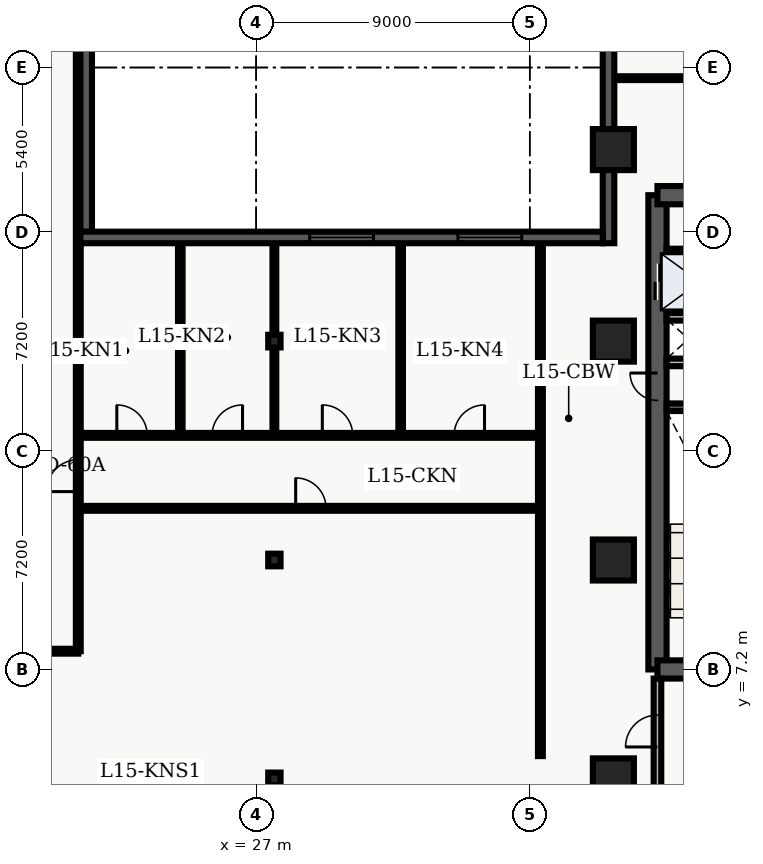
"""IFC4 building model, lengths in metres.
Left out: names, types, materials, properties, quantities, classifications, styles, units other than length and angle.
Written with IfcOpenShell. Run it as: python <this file> out.ifc"""

import sys

from ifc_helpers import new_model, entity, si_unit, converted_unit, direction, frame, origin_with_axes, origin_2d_with_axis, place, context, subcontext, project, spatial, polyline, rectangle, i_section, outline, extrude, element, fill, save


model = new_model("IFC4")
c1 = context("Model", 3, precision=1e-05, world=origin_with_axes(), true_north=direction((0.0, 1.0)))
c2 = subcontext(c1, "Body", "Model", "MODEL_VIEW")
j1 = project(units=[si_unit("LENGTHUNIT", "METRE"), converted_unit("PLANEANGLEUNIT", "DEGREE", entity("IfcPlaneAngleMeasure", 0.017), si_unit("PLANEANGLEUNIT", "RADIAN"), dimensions=[0, 0, 0, 0, 0, 0, 0])], contexts=[c1])
p1 = place(None, origin_with_axes())
s1 = spatial("IfcSite", under=j1, at=p1, CompositionType="ELEMENT")
p2 = place(p1, origin_with_axes())
s2 = spatial("IfcBuilding", under=s1, at=p2, CompositionType="ELEMENT")
p3 = place(p2, frame((0.0, 0.0, 63.9), z_axis=(0.0, 0.0, 1.0), x_axis=(1.0, 0.0, 0.0)))
s3 = spatial("IfcBuildingStorey", under=s2, at=p3, CompositionType="ELEMENT", Elevation=63.9)
p4 = place(p3, frame((40.2, 7.2, 0.0), z_axis=(0.0, 0.0, 1.0), x_axis=(0.0, 1.0, 0.0)))
e1 = element("IfcWall", 1, at=p4, inside=s3, PredefinedType="SHEAR", context=c2, shape_type="SweptSolid", body=[
    extrude(outline(polyline([(0.0, -0.3), (15.6, -0.3), (15.6, 0.3), (0.0, 0.3), (0.0, -0.3)])), origin_with_axes(), (0.0, 0.0, 1.0), 3.66),
])
p5 = place(p4, frame((12.75, 0.0, 0.0), z_axis=(0.0, 0.0, 1.0), x_axis=(1.0, 0.0, 0.0)))
e2 = element("IfcOpeningElement", 2, at=p5, cuts=e1, PredefinedType="OPENING", context=c2, shape_type="SweptSolid", body=[
    extrude(rectangle(XDim=1.2, YDim=0.62, at=origin_2d_with_axis()), origin_with_axes(), (0.0, 0.0, 1.0), 2.15),
])
p6 = place(p4, frame((9.3, 0.0, 0.0), z_axis=(0.0, 0.0, 1.0), x_axis=(1.0, 0.0, 0.0)))
e3 = element("IfcOpeningElement", 3, at=p6, cuts=e1, PredefinedType="OPENING", context=c2, shape_type="SweptSolid", body=[
    extrude(rectangle(XDim=0.9, YDim=0.62, at=origin_2d_with_axis()), origin_with_axes(), (0.0, 0.0, 1.0), 2.15),
])
p7 = place(p3, frame((40.2, 7.2, 0.0), z_axis=(0.0, 0.0, 1.0), x_axis=(1.0, 0.0, 0.0)))
e4 = element("IfcWall", 4, at=p7, inside=s3, PredefinedType="SHEAR", context=c2, shape_type="SweptSolid", body=[
    extrude(outline(polyline([(0.0, -0.3), (7.85, -0.3), (7.85, 0.3), (0.0, 0.3), (0.0, -0.3)])), origin_with_axes(), (0.0, 0.0, 1.0), 3.66),
])
p8 = place(p7, frame((2.175, 0.0, 0.0), z_axis=(0.0, 0.0, 1.0), x_axis=(1.0, 0.0, 0.0)))
e5 = element("IfcOpeningElement", 5, at=p8, cuts=e4, PredefinedType="OPENING", context=c2, shape_type="SweptSolid", body=[
    extrude(rectangle(XDim=1.05, YDim=0.62, at=origin_2d_with_axis()), origin_with_axes(), (0.0, 0.0, 1.0), 2.15),
])
p9 = place(p3, frame((40.2, 22.8, 0.0), z_axis=(0.0, 0.0, 1.0), x_axis=(1.0, 0.0, 0.0)))
e6 = element("IfcWall", 6, at=p9, inside=s3, PredefinedType="SHEAR", context=c2, shape_type="SweptSolid", body=[
    extrude(outline(polyline([(0.0, -0.3), (7.85, -0.3), (7.85, 0.3), (0.0, 0.3), (0.0, -0.3)])), origin_with_axes(), (0.0, 0.0, 1.0), 3.66),
])
p10 = place(p9, frame((5.775, 0.0, 0.0), z_axis=(0.0, 0.0, 1.0), x_axis=(1.0, 0.0, 0.0)))
e7 = element("IfcOpeningElement", 7, at=p10, cuts=e6, PredefinedType="OPENING", context=c2, shape_type="SweptSolid", body=[
    extrude(rectangle(XDim=1.05, YDim=0.62, at=origin_2d_with_axis()), origin_with_axes(), (0.0, 0.0, 1.0), 2.15),
])
p11 = place(p9, frame((2.15, 0.0, 0.0), z_axis=(0.0, 0.0, 1.0), x_axis=(1.0, 0.0, 0.0)))
e8 = element("IfcOpeningElement", 8, at=p11, cuts=e6, PredefinedType="OPENING", context=c2, shape_type="SweptSolid", body=[
    extrude(rectangle(XDim=0.9, YDim=0.62, at=origin_2d_with_axis()), origin_with_axes(), (0.0, 0.0, 1.0), 2.15),
])
p12 = place(p3, frame((40.5, 15.825, 0.0), z_axis=(0.0, 0.0, 1.0), x_axis=(1.0, 0.0, 0.0)))
e9 = element("IfcWall", 9, at=p12, inside=s3, PredefinedType="SHEAR", context=c2, shape_type="SweptSolid", body=[
    extrude(outline(polyline([(0.0, -0.125), (3.5, -0.125), (3.5, 0.125), (0.0, 0.125), (0.0, -0.125)])), origin_with_axes(), (0.0, 0.0, 1.0), 3.66),
])
p13 = place(p3, frame((40.5, 17.3, 0.0), z_axis=(0.0, 0.0, 1.0), x_axis=(1.0, 0.0, 0.0)))
e10 = element("IfcWall", 10, at=p13, inside=s3, PredefinedType="SOLIDWALL", context=c2, shape_type="SweptSolid", body=[
    extrude(outline(polyline([(0.0, -0.125), (3.5, -0.125), (3.5, 0.125), (0.0, 0.125), (0.0, -0.125)])), origin_with_axes(), (0.0, 0.0, 1.0), 2.7),
])
p14 = place(p13, frame((2.4, 0.0, 0.0), z_axis=(0.0, 0.0, 1.0), x_axis=(1.0, 0.0, 0.0)))
e11 = element("IfcOpeningElement", 11, at=p14, cuts=e10, PredefinedType="OPENING", context=c2, shape_type="SweptSolid", body=[
    extrude(rectangle(XDim=0.9, YDim=0.27, at=origin_2d_with_axis()), origin_with_axes(), (0.0, 0.0, 1.0), 2.15),
])
p15 = place(p3, frame((40.5, 18.8, 0.0), z_axis=(0.0, 0.0, 1.0), x_axis=(1.0, 0.0, 0.0)))
e12 = element("IfcWall", 12, at=p15, inside=s3, PredefinedType="SOLIDWALL", context=c2, shape_type="SweptSolid", body=[
    extrude(outline(polyline([(0.0, -0.125), (3.5, -0.125), (3.5, 0.125), (0.0, 0.125), (0.0, -0.125)])), origin_with_axes(), (0.0, 0.0, 1.0), 2.7),
])
p16 = place(p3, frame((40.2, 3.1, 0.0), z_axis=(0.0, 0.0, 1.0), x_axis=(0.0, 1.0, 0.0)))
e13 = element("IfcWall", 13, at=p16, inside=s3, PredefinedType="SOLIDWALL", context=c2, shape_type="SweptSolid", body=[
    extrude(outline(polyline([(0.0, -0.125), (3.8, -0.125), (3.8, 0.125), (0.0, 0.125), (0.0, -0.125)])), origin_with_axes(), (0.0, 0.0, 1.0), 2.7),
])
p17 = place(p16, frame((2.075, 0.0, 0.0), z_axis=(0.0, 0.0, 1.0), x_axis=(1.0, 0.0, 0.0)))
e14 = element("IfcOpeningElement", 14, at=p17, cuts=e13, PredefinedType="OPENING", context=c2, shape_type="SweptSolid", body=[
    extrude(rectangle(XDim=1.05, YDim=0.27, at=origin_2d_with_axis()), origin_with_axes(), (0.0, 0.0, 1.0), 2.15),
])
for number, where, z_axis, x_axis in (
    (15, (27.6, 3.6, 0.0), (0.0, 0.0, 1.0), (1.0, 0.0, 0.0)),
    (16, (27.6, 10.8, 0.0), (0.0, 0.0, 1.0), (1.0, 0.0, 0.0)),
    (17, (27.6, 18.0, 0.0), (0.0, 0.0, 1.0), (1.0, 0.0, 0.0)),
):
    element("IfcColumn", number, at=place(p3, frame(where, z_axis=z_axis, x_axis=x_axis)), inside=s3, PredefinedType="COLUMN", context=c2, shape_type="SweptSolid", body=[
        extrude(i_section(OverallWidth=0.406, OverallDepth=0.416, WebThickness=0.03, FlangeThickness=0.048, FilletRadius=0.022, at=origin_2d_with_axis()), origin_with_axes(), (0.0, 0.0, 1.0), 3.9),
    ])
for number, where, z_axis, x_axis in (
    (18, (38.75, 3.6, 0.0), (0.0, 0.0, 1.0), (1.0, 0.0, 0.0)),
    (19, (38.75, 10.8, 0.0), (0.0, 0.0, 1.0), (1.0, 0.0, 0.0)),
    (20, (38.75, 18.0, 0.0), (0.0, 0.0, 1.0), (1.0, 0.0, 0.0)),
    (21, (38.75, 24.3, 0.0), (0.0, 0.0, 1.0), (1.0, 0.0, 0.0)),
):
    element("IfcColumn", number, at=place(p3, frame(where, z_axis=z_axis, x_axis=x_axis)), inside=s3, PredefinedType="COLUMN", context=c2, shape_type="SweptSolid", body=[
        extrude(rectangle(XDim=1.35, YDim=1.35, at=origin_2d_with_axis()), origin_with_axes(), (0.0, 0.0, 1.0), 3.9),
    ])
p18 = place(p3, frame((40.5, 20.96, 0.0), z_axis=(0.0, 0.0, 1.0), x_axis=(1.0, 0.0, 0.0)))
e22 = element("IfcWall", 22, at=p18, inside=s3, PredefinedType="PARTITIONING", context=c2, shape_type="SweptSolid", body=[
    extrude(outline(polyline([(0.0, -0.08), (3.5, -0.08), (3.5, 0.08), (0.0, 0.08), (0.0, -0.08)])), origin_with_axes(), (0.0, 0.0, 1.0), 2.7),
])
p19 = place(p3, frame((2.6, 7.8, 0.0), z_axis=(0.0, 0.0, 1.0), x_axis=(1.0, 0.0, 0.0)))
e23 = element("IfcWall", 23, at=p19, inside=s3, PredefinedType="PARTITIONING", context=c2, shape_type="SweptSolid", body=[
    extrude(outline(polyline([(0.0, -0.08), (18.55, -0.08), (18.55, 0.08), (0.0, 0.08), (0.0, -0.08)])), origin_with_axes(), (0.0, 0.0, 1.0), 2.7),
])
p20 = place(p19, frame((1.825, 0.0, 0.0), z_axis=(0.0, 0.0, 1.0), x_axis=(1.0, 0.0, 0.0)))
e24 = element("IfcOpeningElement", 24, at=p20, cuts=e23, PredefinedType="OPENING", context=c2, shape_type="SweptSolid", body=[
    extrude(rectangle(XDim=1.0, YDim=0.18, at=origin_2d_with_axis()), origin_with_axes(), (0.0, 0.0, 1.0), 2.15),
])
p21 = place(p19, frame((6.229, 0.0, 0.0), z_axis=(0.0, 0.0, 1.0), x_axis=(1.0, 0.0, 0.0)))
e25 = element("IfcOpeningElement", 25, at=p21, cuts=e23, PredefinedType="OPENING", context=c2, shape_type="SweptSolid", body=[
    extrude(rectangle(XDim=1.0, YDim=0.18, at=origin_2d_with_axis()), origin_with_axes(), (0.0, 0.0, 1.0), 2.15),
])
p22 = place(p19, frame((10.706, 0.0, 0.0), z_axis=(0.0, 0.0, 1.0), x_axis=(1.0, 0.0, 0.0)))
e26 = element("IfcOpeningElement", 26, at=p22, cuts=e23, PredefinedType="OPENING", context=c2, shape_type="SweptSolid", body=[
    extrude(rectangle(XDim=1.0, YDim=0.18, at=origin_2d_with_axis()), origin_with_axes(), (0.0, 0.0, 1.0), 2.15),
])
p23 = place(p19, frame((15.556, 0.0, 0.0), z_axis=(0.0, 0.0, 1.0), x_axis=(1.0, 0.0, 0.0)))
e27 = element("IfcOpeningElement", 27, at=p23, cuts=e23, PredefinedType="OPENING", context=c2, shape_type="SweptSolid", body=[
    extrude(rectangle(XDim=1.0, YDim=0.18, at=origin_2d_with_axis()), origin_with_axes(), (0.0, 0.0, 1.0), 2.15),
])
p24 = place(p3, frame((21.15, 7.8, 0.0), z_axis=(0.0, 0.0, 1.0), x_axis=(0.0, 1.0, 0.0)))
e28 = element("IfcWall", 28, at=p24, inside=s3, PredefinedType="PARTITIONING", context=c2, shape_type="SweptSolid", body=[
    extrude(outline(polyline([(0.0, -0.08), (32.7, -0.08), (32.7, 0.08), (0.0, 0.08), (0.0, -0.08)])), origin_with_axes(), (0.0, 0.0, 1.0), 2.7),
])
p25 = place(p24, frame((5.775, 0.0, 0.0), z_axis=(0.0, 0.0, 1.0), x_axis=(1.0, 0.0, 0.0)))
e29 = element("IfcOpeningElement", 29, at=p25, cuts=e28, PredefinedType="OPENING", context=c2, shape_type="SweptSolid", body=[
    extrude(rectangle(XDim=1.05, YDim=0.18, at=origin_2d_with_axis()), origin_with_axes(), (0.0, 0.0, 1.0), 2.15),
])
p26 = place(p3, frame((21.15, 12.5, 0.0), z_axis=(0.0, 0.0, 1.0), x_axis=(1.0, 0.0, 0.0)))
e30 = element("IfcWall", 30, at=p26, inside=s3, PredefinedType="PARTITIONING", context=c2, shape_type="SweptSolid", body=[
    extrude(outline(polyline([(0.0, -0.08), (15.2, -0.08), (15.2, 0.08), (0.0, 0.08), (0.0, -0.08)])), origin_with_axes(), (0.0, 0.0, 1.0), 2.7),
])
p27 = place(p26, frame((7.65, 0.0, 0.0), z_axis=(0.0, 0.0, 1.0), x_axis=(1.0, 0.0, 0.0)))
e31 = element("IfcOpeningElement", 31, at=p27, cuts=e30, PredefinedType="OPENING", context=c2, shape_type="SweptSolid", body=[
    extrude(rectangle(XDim=1.0, YDim=0.18, at=origin_2d_with_axis()), origin_with_axes(), (0.0, 0.0, 1.0), 2.15),
])
p28 = place(p3, frame((21.15, 14.9, 0.0), z_axis=(0.0, 0.0, 1.0), x_axis=(1.0, 0.0, 0.0)))
e32 = element("IfcWall", 32, at=p28, inside=s3, PredefinedType="PARTITIONING", context=c2, shape_type="SweptSolid", body=[
    extrude(outline(polyline([(0.0, -0.08), (15.2, -0.08), (15.2, 0.08), (0.0, 0.08), (0.0, -0.08)])), origin_with_axes(), (0.0, 0.0, 1.0), 2.7),
])
p29 = place(p28, frame((1.768, 0.0, 0.0), z_axis=(0.0, 0.0, 1.0), x_axis=(1.0, 0.0, 0.0)))
e33 = element("IfcOpeningElement", 33, at=p29, cuts=e32, PredefinedType="OPENING", context=c2, shape_type="SweptSolid", body=[
    extrude(rectangle(XDim=1.0, YDim=0.18, at=origin_2d_with_axis()), origin_with_axes(), (0.0, 0.0, 1.0), 2.15),
])
p30 = place(p28, frame((4.902, 0.0, 0.0), z_axis=(0.0, 0.0, 1.0), x_axis=(1.0, 0.0, 0.0)))
e34 = element("IfcOpeningElement", 34, at=p30, cuts=e32, PredefinedType="OPENING", context=c2, shape_type="SweptSolid", body=[
    extrude(rectangle(XDim=1.0, YDim=0.18, at=origin_2d_with_axis()), origin_with_axes(), (0.0, 0.0, 1.0), 2.15),
])
p31 = place(p28, frame((8.527, 0.0, 0.0), z_axis=(0.0, 0.0, 1.0), x_axis=(1.0, 0.0, 0.0)))
e35 = element("IfcOpeningElement", 35, at=p31, cuts=e32, PredefinedType="OPENING", context=c2, shape_type="SweptSolid", body=[
    extrude(rectangle(XDim=1.0, YDim=0.18, at=origin_2d_with_axis()), origin_with_axes(), (0.0, 0.0, 1.0), 2.15),
])
p32 = place(p28, frame((12.861, 0.0, 0.0), z_axis=(0.0, 0.0, 1.0), x_axis=(1.0, 0.0, 0.0)))
e36 = element("IfcOpeningElement", 36, at=p32, cuts=e32, PredefinedType="OPENING", context=c2, shape_type="SweptSolid", body=[
    extrude(rectangle(XDim=1.0, YDim=0.18, at=origin_2d_with_axis()), origin_with_axes(), (0.0, 0.0, 1.0), 2.15),
])
p33 = place(p3, frame((36.35, 4.35, 0.0), z_axis=(0.0, 0.0, 1.0), x_axis=(0.0, 1.0, 0.0)))
e37 = element("IfcWall", 37, at=p33, inside=s3, PredefinedType="PARTITIONING", context=c2, shape_type="SweptSolid", body=[
    extrude(outline(polyline([(0.0, -0.08), (16.95, -0.08), (16.95, 0.08), (0.0, 0.08), (0.0, -0.08)])), origin_with_axes(), (0.0, 0.0, 1.0), 2.7),
])
p34 = place(p3, frame((24.505, 15.02, 0.0), z_axis=(0.0, 0.0, 1.0), x_axis=(0.0, 1.0, 0.0)))
e38 = element("IfcWall", 38, at=p34, inside=s3, PredefinedType="PARTITIONING", context=c2, shape_type="SweptSolid", body=[
    extrude(outline(polyline([(0.0, -0.075), (6.205, -0.075), (6.205, 0.075), (0.0, 0.075), (0.0, -0.075)])), origin_with_axes(), (0.0, 0.0, 1.0), 2.7),
])
p35 = place(p3, frame((27.6, 15.02, 0.0), z_axis=(0.0, 0.0, 1.0), x_axis=(0.0, 1.0, 0.0)))
e39 = element("IfcWall", 39, at=p35, inside=s3, PredefinedType="PARTITIONING", context=c2, shape_type="SweptSolid", body=[
    extrude(outline(polyline([(0.0, -0.062), (6.205, -0.062), (6.205, 0.062), (0.0, 0.062), (0.0, -0.062)])), origin_with_axes(), (0.0, 0.0, 1.0), 2.7),
])
p36 = place(p3, frame((31.753, 15.02, 0.0), z_axis=(0.0, 0.0, 1.0), x_axis=(0.0, 1.0, 0.0)))
e40 = element("IfcWall", 40, at=p36, inside=s3, PredefinedType="PARTITIONING", context=c2, shape_type="SweptSolid", body=[
    extrude(outline(polyline([(0.0, -0.075), (6.205, -0.075), (6.205, 0.075), (0.0, 0.075), (0.0, -0.075)])), origin_with_axes(), (0.0, 0.0, 1.0), 2.7),
])
p37 = place(p3, frame((38.76, 26.65, 0.0), z_axis=(0.0, 0.0, 1.0), x_axis=(1.0, 0.0, 0.0)))
e41 = element("IfcWall", 41, at=p37, inside=s3, PredefinedType="PARTITIONING", context=c2, shape_type="SweptSolid", body=[
    extrude(outline(polyline([(0.0, -0.062), (20.88, -0.062), (20.88, 0.062), (0.0, 0.062), (0.0, -0.062)])), origin_with_axes(), (0.0, 0.0, 1.0), 2.7),
])
p38 = place(p37, frame((4.24, 0.0, 0.0), z_axis=(0.0, 0.0, 1.0), x_axis=(1.0, 0.0, 0.0)))
e42 = element("IfcOpeningElement", 42, at=p38, cuts=e41, PredefinedType="OPENING", context=c2, shape_type="SweptSolid", body=[
    extrude(rectangle(XDim=1.0, YDim=0.145, at=origin_2d_with_axis()), origin_with_axes(), (0.0, 0.0, 1.0), 2.15),
])
p39 = place(p3, frame((38.59, 21.22, 0.0), z_axis=(0.0, 0.0, 1.0), x_axis=(0.0, 1.0, 0.0)))
e43 = element("IfcWall", 43, at=p39, inside=s3, PredefinedType="SOLIDWALL", context=c2, shape_type="SweptSolid", body=[
    extrude(outline(polyline([(0.0, -0.19), (7.58, -0.19), (7.58, 0.19), (0.0, 0.19), (0.0, -0.19)])), origin_with_axes(), (0.0, 0.0, 1.0), 3.66),
])
p40 = place(p3, frame((21.41, 45.82, 0.0), z_axis=(0.0, 0.0, 1.0), x_axis=(0.0, -1.0, 0.0)))
e44 = element("IfcWall", 44, at=p40, inside=s3, PredefinedType="SOLIDWALL", context=c2, shape_type="SweptSolid", body=[
    extrude(outline(polyline([(0.0, -0.19), (24.22, -0.19), (24.22, 0.19), (0.0, 0.19), (0.0, -0.19)])), origin_with_axes(), (0.0, 0.0, 1.0), 3.66),
])
p41 = place(p40, frame((2.902, 0.0, 0.45), z_axis=(0.0, 0.0, 1.0), x_axis=(1.0, 0.0, 0.0)))
e45 = element("IfcOpeningElement", 45, at=p41, cuts=e44, PredefinedType="OPENING", context=c2, shape_type="SweptSolid", body=[
    extrude(rectangle(XDim=2.1, YDim=0.4, at=origin_2d_with_axis()), origin_with_axes(), (0.0, 0.0, 1.0), 2.2),
])
p42 = place(p3, frame((21.22, 21.41, 0.0), z_axis=(0.0, 0.0, 1.0), x_axis=(1.0, 0.0, 0.0)))
e46 = element("IfcWall", 46, at=p42, inside=s3, PredefinedType="SOLIDWALL", context=c2, shape_type="SweptSolid", body=[
    extrude(outline(polyline([(0.0, -0.19), (17.18, -0.19), (17.18, 0.19), (0.0, 0.19), (0.0, -0.19)])), origin_with_axes(), (0.0, 0.0, 1.0), 3.66),
])
p43 = place(p42, frame((8.59, 0.0, 0.45), z_axis=(0.0, 0.0, 1.0), x_axis=(1.0, 0.0, 0.0)))
e47 = element("IfcOpeningElement", 47, at=p43, cuts=e46, PredefinedType="OPENING", context=c2, shape_type="SweptSolid", body=[
    extrude(rectangle(XDim=2.1, YDim=0.4, at=origin_2d_with_axis()), origin_with_axes(), (0.0, 0.0, 1.0), 2.2),
])
p44 = place(p42, frame((13.467, 0.0, 0.45), z_axis=(0.0, 0.0, 1.0), x_axis=(1.0, 0.0, 0.0)))
e48 = element("IfcOpeningElement", 48, at=p44, cuts=e46, PredefinedType="OPENING", context=c2, shape_type="SweptSolid", body=[
    extrude(rectangle(XDim=2.1, YDim=0.4, at=origin_2d_with_axis()), origin_with_axes(), (0.0, 0.0, 1.0), 2.2),
])
p45 = place(p4, frame((12.75, 0.0, 0.0), z_axis=(0.0, 0.0, 1.0), x_axis=(1.0, 0.0, 0.0)))
e49 = element("IfcDoor", 49, at=p45, inside=s3, OperationType="DOUBLE_DOOR_SLIDING", PredefinedType="DOOR", context=c2, shape_type="SweptSolid", body=[
    extrude(rectangle(XDim=1.2, YDim=0.09, at=origin_2d_with_axis()), origin_with_axes(), (0.0, 0.0, 1.0), 2.15),
])
fill(e2, e49)
p46 = place(p4, frame((9.3, 0.0, 0.0), z_axis=(0.0, 0.0, 1.0), x_axis=(1.0, 0.0, 0.0)))
e50 = element("IfcDoor", 50, at=p46, inside=s3, OperationType="SINGLE_SWING_RIGHT", PredefinedType="DOOR", context=c2, shape_type="SweptSolid", body=[
    extrude(rectangle(XDim=0.9, YDim=0.09, at=origin_2d_with_axis()), origin_with_axes(), (0.0, 0.0, 1.0), 2.15),
])
fill(e3, e50)
p47 = place(p16, frame((2.075, 0.0, 0.0), z_axis=(0.0, 0.0, 1.0), x_axis=(1.0, 0.0, 0.0)))
e51 = element("IfcDoor", 51, at=p47, inside=s3, OperationType="SINGLE_SWING_LEFT", PredefinedType="DOOR", context=c2, shape_type="SweptSolid", body=[
    extrude(rectangle(XDim=1.05, YDim=0.09, at=origin_2d_with_axis()), origin_with_axes(), (0.0, 0.0, 1.0), 2.15),
])
fill(e14, e51)
p48 = place(p24, frame((5.775, 0.0, 0.0), z_axis=(0.0, 0.0, 1.0), x_axis=(1.0, 0.0, 0.0)))
e52 = element("IfcDoor", 52, at=p48, inside=s3, OperationType="SINGLE_SWING_LEFT", PredefinedType="DOOR", context=c2, shape_type="SweptSolid", body=[
    extrude(rectangle(XDim=1.05, YDim=0.09, at=origin_2d_with_axis()), origin_with_axes(), (0.0, 0.0, 1.0), 2.15),
])
fill(e29, e52)
p49 = place(p26, frame((7.65, 0.0, 0.0), z_axis=(0.0, 0.0, 1.0), x_axis=(1.0, 0.0, 0.0)))
e53 = element("IfcDoor", 53, at=p49, inside=s3, OperationType="SINGLE_SWING_LEFT", PredefinedType="DOOR", context=c2, shape_type="SweptSolid", body=[
    extrude(rectangle(XDim=1.0, YDim=0.09, at=origin_2d_with_axis()), origin_with_axes(), (0.0, 0.0, 1.0), 2.15),
])
fill(e31, e53)
p50 = place(p28, frame((1.768, 0.0, 0.0), z_axis=(0.0, 0.0, 1.0), x_axis=(1.0, 0.0, 0.0)))
e54 = element("IfcDoor", 54, at=p50, inside=s3, OperationType="SINGLE_SWING_LEFT", PredefinedType="DOOR", context=c2, shape_type="SweptSolid", body=[
    extrude(rectangle(XDim=1.0, YDim=0.09, at=origin_2d_with_axis()), origin_with_axes(), (0.0, 0.0, 1.0), 2.15),
])
fill(e33, e54)
p51 = place(p28, frame((4.902, 0.0, 0.0), z_axis=(0.0, 0.0, 1.0), x_axis=(1.0, 0.0, 0.0)))
e55 = element("IfcDoor", 55, at=p51, inside=s3, OperationType="SINGLE_SWING_RIGHT", PredefinedType="DOOR", context=c2, shape_type="SweptSolid", body=[
    extrude(rectangle(XDim=1.0, YDim=0.09, at=origin_2d_with_axis()), origin_with_axes(), (0.0, 0.0, 1.0), 2.15),
])
fill(e34, e55)
p52 = place(p28, frame((8.527, 0.0, 0.0), z_axis=(0.0, 0.0, 1.0), x_axis=(1.0, 0.0, 0.0)))
e56 = element("IfcDoor", 56, at=p52, inside=s3, OperationType="SINGLE_SWING_LEFT", PredefinedType="DOOR", context=c2, shape_type="SweptSolid", body=[
    extrude(rectangle(XDim=1.0, YDim=0.09, at=origin_2d_with_axis()), origin_with_axes(), (0.0, 0.0, 1.0), 2.15),
])
fill(e35, e56)
p53 = place(p28, frame((12.861, 0.0, 0.0), z_axis=(0.0, 0.0, 1.0), x_axis=(1.0, 0.0, 0.0)))
e57 = element("IfcDoor", 57, at=p53, inside=s3, OperationType="SINGLE_SWING_RIGHT", PredefinedType="DOOR", context=c2, shape_type="SweptSolid", body=[
    extrude(rectangle(XDim=1.0, YDim=0.09, at=origin_2d_with_axis()), origin_with_axes(), (0.0, 0.0, 1.0), 2.15),
])
fill(e36, e57)
p54 = place(p42, frame((8.59, 0.0, 0.45), z_axis=(0.0, 0.0, 1.0), x_axis=(1.0, 0.0, 0.0)))
e58 = element("IfcWindow", 58, at=p54, inside=s3, PredefinedType="WINDOW", context=c2, shape_type="SweptSolid", body=[
    extrude(rectangle(XDim=2.1, YDim=0.09, at=origin_2d_with_axis()), origin_with_axes(), (0.0, 0.0, 1.0), 2.2),
])
fill(e47, e58)
p55 = place(p42, frame((13.467, 0.0, 0.45), z_axis=(0.0, 0.0, 1.0), x_axis=(1.0, 0.0, 0.0)))
e59 = element("IfcWindow", 59, at=p55, inside=s3, PredefinedType="WINDOW", context=c2, shape_type="SweptSolid", body=[
    extrude(rectangle(XDim=2.1, YDim=0.09, at=origin_2d_with_axis()), origin_with_axes(), (0.0, 0.0, 1.0), 2.2),
])
fill(e48, e59)
save(model, sys.argv[1])
